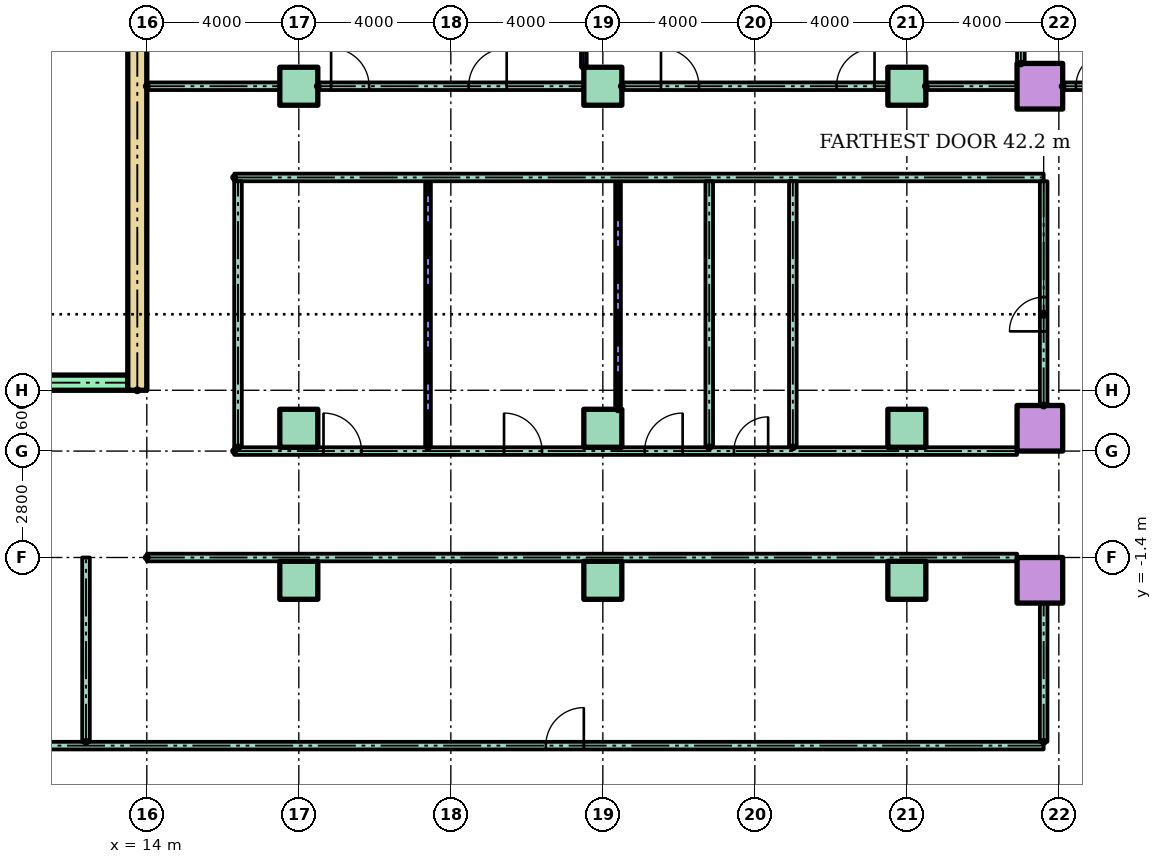
"""IFC4 building model, lengths in metres.
Left out: names, types, materials, properties, quantities, classifications, styles, units other than length and angle.
Written with IfcOpenShell. Run it as: python <this file> out.ifc"""

import sys

from ifc_helpers import new_model, si_unit, direction, frame, frame_2d, origin, origin_2d, place, context, subcontext, project, spatial, rectangle, hollow_rectangle, extrude, element, fill, save


model = new_model("IFC4")
c1 = context("Model", 3, precision=1e-05, world=origin(), true_north=direction((0.0, 1.0)))
c2 = subcontext(c1, "Body", "Model", "MODEL_VIEW")
j1 = project(units=[si_unit("LENGTHUNIT", "METRE"), si_unit("PLANEANGLEUNIT", "RADIAN")], contexts=[c1])
p1 = place(None, origin())
s1 = spatial("IfcSite", under=j1, at=p1, CompositionType="ELEMENT")
p2 = place(p1, origin())
s2 = spatial("IfcBuilding", under=s1, at=p2, CompositionType="ELEMENT")
p3 = place(p2, frame((0.0, 0.0, 6.0)))
s3 = spatial("IfcBuildingStorey", under=s2, at=p3, CompositionType="ELEMENT", Elevation=6.0)
for number, where in (
    (1, (18.0, -2.0, 0.0)),
    (2, (26.0, -2.0, 0.0)),
    (3, (34.0, -2.0, 0.0)),
):
    element("IfcColumn", number, at=place(p3, frame(where)), inside=s3, PredefinedType="COLUMN", context=c2, shape_type="SweptSolid", body=[
        extrude(rectangle(XDim=1.0, YDim=1.0, at=origin_2d()), origin(), (0.0, 0.0, 1.0), 4.0),
    ])
p4 = place(p3, frame((37.5, -2.0, 0.0)))
e4 = element("IfcColumn", 4, at=p4, inside=s3, PredefinedType="COLUMN", context=c2, shape_type="SweptSolid", body=[
    extrude(hollow_rectangle(XDim=1.2, YDim=1.2, WallThickness=0.06, at=origin_2d()), origin(), (0.0, 0.0, 1.0), 4.0),
])
for number, where in (
    (5, (18.0, 2.0, 0.0)),
    (6, (26.0, 2.0, 0.0)),
    (7, (34.0, 2.0, 0.0)),
):
    element("IfcColumn", number, at=place(p3, frame(where)), inside=s3, PredefinedType="COLUMN", context=c2, shape_type="SweptSolid", body=[
        extrude(rectangle(XDim=1.0, YDim=1.0, at=origin_2d()), origin(), (0.0, 0.0, 1.0), 4.0),
    ])
p5 = place(p3, frame((37.5, 2.0, 0.0)))
e8 = element("IfcColumn", 8, at=p5, inside=s3, PredefinedType="COLUMN", context=c2, shape_type="SweptSolid", body=[
    extrude(hollow_rectangle(XDim=1.2, YDim=1.2, WallThickness=0.06, at=origin_2d()), origin(), (0.0, 0.0, 1.0), 4.0),
])
for number, where in (
    (9, (18.0, 11.0, 0.0)),
    (10, (26.0, 11.0, 0.0)),
    (11, (34.0, 11.0, 0.0)),
):
    element("IfcColumn", number, at=place(p3, frame(where)), inside=s3, PredefinedType="COLUMN", context=c2, shape_type="SweptSolid", body=[
        extrude(rectangle(XDim=1.0, YDim=1.0, at=origin_2d()), origin(), (0.0, 0.0, 1.0), 4.0),
    ])
p6 = place(p3, frame((37.5, 11.0, 0.0)))
e12 = element("IfcColumn", 12, at=p6, inside=s3, PredefinedType="COLUMN", context=c2, shape_type="SweptSolid", body=[
    extrude(hollow_rectangle(XDim=1.2, YDim=1.2, WallThickness=0.06, at=origin_2d()), origin(), (0.0, 0.0, 1.0), 4.0),
])
p7 = place(p3, frame((13.75, 3.0, 0.0), z_axis=(0.0, 0.0, 1.0), x_axis=(0.0, 1.0, 0.0)))
e13 = element("IfcWall", 13, at=p7, inside=s3, PredefinedType="SHEAR", context=c2, shape_type="SweptSolid", body=[
    extrude(rectangle(XDim=17.0, YDim=0.5, at=frame_2d((8.5, 0.0))), origin(), (0.0, 0.0, 1.0), 3.7),
])
p8 = place(p3, frame((-13.5, 3.2, 0.0)))
e14 = element("IfcWall", 14, at=p8, inside=s3, PredefinedType="SHEAR", context=c2, shape_type="SweptSolid", body=[
    extrude(rectangle(XDim=27.0, YDim=0.4, at=frame_2d((13.5, 0.0))), origin(), (0.0, 0.0, 1.0), 3.7),
])
p9 = place(p8, frame((6.861, 0.0, 0.0)))
e15 = element("IfcOpeningElement", 15, at=p9, cuts=e14, PredefinedType="OPENING", context=c2, shape_type="SweptSolid", body=[
    extrude(rectangle(XDim=1.1, YDim=2.1, at=frame_2d((0.55, 1.05))), frame((0.0, 0.21, 0.0), z_axis=(0.0, -1.0, 0.0), x_axis=(1.0, 0.0, 0.0)), (0.0, 0.0, 1.0), 0.42),
])
p10 = place(p8, frame((9.906, 0.0, 0.0)))
e16 = element("IfcOpeningElement", 16, at=p10, cuts=e14, PredefinedType="OPENING", context=c2, shape_type="SweptSolid", body=[
    extrude(rectangle(XDim=1.1, YDim=2.1, at=frame_2d((0.55, 1.05))), frame((0.0, 0.21, 0.0), z_axis=(0.0, -1.0, 0.0), x_axis=(1.0, 0.0, 0.0)), (0.0, 0.0, 1.0), 0.42),
])
p11 = place(p8, frame((15.994, 0.0, 0.0)))
e17 = element("IfcOpeningElement", 17, at=p11, cuts=e14, PredefinedType="OPENING", context=c2, shape_type="SweptSolid", body=[
    extrude(rectangle(XDim=1.1, YDim=2.1, at=frame_2d((0.55, 1.05))), frame((0.0, 0.21, 0.0), z_axis=(0.0, -1.0, 0.0), x_axis=(1.0, 0.0, 0.0)), (0.0, 0.0, 1.0), 0.42),
])
p12 = place(p8, frame((19.039, 0.0, 0.0)))
e18 = element("IfcOpeningElement", 18, at=p12, cuts=e14, PredefinedType="OPENING", context=c2, shape_type="SweptSolid", body=[
    extrude(rectangle(XDim=1.1, YDim=2.1, at=frame_2d((0.55, 1.05))), frame((0.0, 0.21, 0.0), z_axis=(0.0, -1.0, 0.0), x_axis=(1.0, 0.0, 0.0)), (0.0, 0.0, 1.0), 0.42),
])
p13 = place(p8, frame((12.6, 0.0, 0.0)))
e19 = element("IfcOpeningElement", 19, at=p13, cuts=e14, PredefinedType="OPENING", context=c2, shape_type="SweptSolid", body=[
    extrude(rectangle(XDim=1.8, YDim=2.1, at=frame_2d((0.9, 1.05))), frame((0.0, 0.21, 0.0), z_axis=(0.0, -1.0, 0.0), x_axis=(1.0, 0.0, 0.0)), (0.0, 0.0, 1.0), 0.42),
])
p14 = place(p3, frame((-37.6, -6.35, 0.0)))
e20 = element("IfcWall", 20, at=p14, inside=s3, PredefinedType="PARTITIONING", context=c2, shape_type="SweptSolid", body=[
    extrude(rectangle(XDim=75.2, YDim=0.2, at=frame_2d((37.6, 0.0))), origin(), (0.0, 0.0, 1.0), 3.7),
])
p15 = place(p14, frame((4.0, 0.0, 0.0)))
e21 = element("IfcOpeningElement", 21, at=p15, cuts=e20, PredefinedType="OPENING", context=c2, shape_type="SweptSolid", body=[
    extrude(rectangle(XDim=1.0, YDim=2.1, at=frame_2d((0.5, 1.05))), frame((0.0, 0.11, 0.0), z_axis=(0.0, -1.0, 0.0), x_axis=(1.0, 0.0, 0.0)), (0.0, 0.0, 1.0), 0.22),
])
p16 = place(p14, frame((13.0, 0.0, 0.0)))
e22 = element("IfcOpeningElement", 22, at=p16, cuts=e20, PredefinedType="OPENING", context=c2, shape_type="SweptSolid", body=[
    extrude(rectangle(XDim=1.0, YDim=2.1, at=frame_2d((0.5, 1.05))), frame((0.0, 0.11, 0.0), z_axis=(0.0, -1.0, 0.0), x_axis=(1.0, 0.0, 0.0)), (0.0, 0.0, 1.0), 0.22),
])
p17 = place(p14, frame((21.55, 0.0, 0.0)))
e23 = element("IfcOpeningElement", 23, at=p17, cuts=e20, PredefinedType="OPENING", context=c2, shape_type="SweptSolid", body=[
    extrude(rectangle(XDim=0.9, YDim=2.1, at=frame_2d((0.45, 1.05))), frame((0.0, 0.11, 0.0), z_axis=(0.0, -1.0, 0.0), x_axis=(1.0, 0.0, 0.0)), (0.0, 0.0, 1.0), 0.22),
])
p18 = place(p14, frame((31.5, 0.0, 0.0)))
e24 = element("IfcOpeningElement", 24, at=p18, cuts=e20, PredefinedType="OPENING", context=c2, shape_type="SweptSolid", body=[
    extrude(rectangle(XDim=1.0, YDim=2.1, at=frame_2d((0.5, 1.05))), frame((0.0, 0.11, 0.0), z_axis=(0.0, -1.0, 0.0), x_axis=(1.0, 0.0, 0.0)), (0.0, 0.0, 1.0), 0.22),
])
p19 = place(p14, frame((43.5, 0.0, 0.0)))
e25 = element("IfcOpeningElement", 25, at=p19, cuts=e20, PredefinedType="OPENING", context=c2, shape_type="SweptSolid", body=[
    extrude(rectangle(XDim=1.0, YDim=2.1, at=frame_2d((0.5, 1.05))), frame((0.0, 0.11, 0.0), z_axis=(0.0, -1.0, 0.0), x_axis=(1.0, 0.0, 0.0)), (0.0, 0.0, 1.0), 0.22),
])
p20 = place(p14, frame((62.1, 0.0, 0.0)))
e26 = element("IfcOpeningElement", 26, at=p20, cuts=e20, PredefinedType="OPENING", context=c2, shape_type="SweptSolid", body=[
    extrude(rectangle(XDim=1.0, YDim=2.1, at=frame_2d((0.5, 1.05))), frame((0.0, 0.11, 0.0), z_axis=(0.0, -1.0, 0.0), x_axis=(1.0, 0.0, 0.0)), (0.0, 0.0, 1.0), 0.22),
])
p21 = place(p3, frame((14.0, -1.4, 0.0)))
e27 = element("IfcWall", 27, at=p21, inside=s3, PredefinedType="PARTITIONING", context=c2, shape_type="SweptSolid", body=[
    extrude(rectangle(XDim=22.9, YDim=0.2, at=frame_2d((11.45, 0.0))), origin(), (0.0, 0.0, 1.0), 3.7),
])
p22 = place(p3, frame((16.3, 1.4, 0.0)))
e28 = element("IfcWall", 28, at=p22, inside=s3, PredefinedType="PARTITIONING", context=c2, shape_type="SweptSolid", body=[
    extrude(rectangle(XDim=20.6, YDim=0.2, at=frame_2d((10.3, 0.0))), origin(), (0.0, 0.0, 1.0), 3.7),
])
p23 = place(p22, frame((2.35, 0.0, 0.0)))
e29 = element("IfcOpeningElement", 29, at=p23, cuts=e28, PredefinedType="OPENING", context=c2, shape_type="SweptSolid", body=[
    extrude(rectangle(XDim=1.0, YDim=2.1, at=frame_2d((0.5, 1.05))), frame((0.0, 0.11, 0.0), z_axis=(0.0, -1.0, 0.0), x_axis=(1.0, 0.0, 0.0)), (0.0, 0.0, 1.0), 0.22),
])
p24 = place(p22, frame((7.1, 0.0, 0.0)))
e30 = element("IfcOpeningElement", 30, at=p24, cuts=e28, PredefinedType="OPENING", context=c2, shape_type="SweptSolid", body=[
    extrude(rectangle(XDim=1.0, YDim=2.1, at=frame_2d((0.5, 1.05))), frame((0.0, 0.11, 0.0), z_axis=(0.0, -1.0, 0.0), x_axis=(1.0, 0.0, 0.0)), (0.0, 0.0, 1.0), 0.22),
])
p25 = place(p22, frame((10.8, 0.0, 0.0)))
e31 = element("IfcOpeningElement", 31, at=p25, cuts=e28, PredefinedType="OPENING", context=c2, shape_type="SweptSolid", body=[
    extrude(rectangle(XDim=1.0, YDim=2.1, at=frame_2d((0.5, 1.05))), frame((0.0, 0.11, 0.0), z_axis=(0.0, -1.0, 0.0), x_axis=(1.0, 0.0, 0.0)), (0.0, 0.0, 1.0), 0.22),
])
p26 = place(p22, frame((13.15, 0.0, 0.0)))
e32 = element("IfcOpeningElement", 32, at=p26, cuts=e28, PredefinedType="OPENING", context=c2, shape_type="SweptSolid", body=[
    extrude(rectangle(XDim=0.9, YDim=2.1, at=frame_2d((0.45, 1.05))), frame((0.0, 0.11, 0.0), z_axis=(0.0, -1.0, 0.0), x_axis=(1.0, 0.0, 0.0)), (0.0, 0.0, 1.0), 0.22),
])
p27 = place(p3, frame((16.3, 8.6, 0.0)))
e33 = element("IfcWall", 33, at=p27, inside=s3, PredefinedType="PARTITIONING", context=c2, shape_type="SweptSolid", body=[
    extrude(rectangle(XDim=21.3, YDim=0.2, at=frame_2d((10.65, 0.0))), origin(), (0.0, 0.0, 1.0), 3.7),
])
p28 = place(p3, frame((14.0, 11.0, 0.0)))
e34 = element("IfcWall", 34, at=p28, inside=s3, PredefinedType="PARTITIONING", context=c2, shape_type="SweptSolid", body=[
    extrude(rectangle(XDim=3.5, YDim=0.2, at=frame_2d((1.75, 0.0))), origin(), (0.0, 0.0, 1.0), 3.7),
])
p29 = place(p3, frame((18.5, 11.0, 0.0)))
e35 = element("IfcWall", 35, at=p29, inside=s3, PredefinedType="PARTITIONING", context=c2, shape_type="SweptSolid", body=[
    extrude(rectangle(XDim=7.0, YDim=0.2, at=frame_2d((3.5, 0.0))), origin(), (0.0, 0.0, 1.0), 3.7),
])
p30 = place(p29, frame((0.35, 0.0, 0.0)))
e36 = element("IfcOpeningElement", 36, at=p30, cuts=e35, PredefinedType="OPENING", context=c2, shape_type="SweptSolid", body=[
    extrude(rectangle(XDim=1.0, YDim=2.1, at=frame_2d((0.5, 1.05))), frame((0.0, 0.11, 0.0), z_axis=(0.0, -1.0, 0.0), x_axis=(1.0, 0.0, 0.0)), (0.0, 0.0, 1.0), 0.22),
])
p31 = place(p29, frame((3.97, 0.0, 0.0)))
e37 = element("IfcOpeningElement", 37, at=p31, cuts=e35, PredefinedType="OPENING", context=c2, shape_type="SweptSolid", body=[
    extrude(rectangle(XDim=1.0, YDim=2.1, at=frame_2d((0.5, 1.05))), frame((0.0, 0.11, 0.0), z_axis=(0.0, -1.0, 0.0), x_axis=(1.0, 0.0, 0.0)), (0.0, 0.0, 1.0), 0.22),
])
p32 = place(p3, frame((26.5, 11.0, 0.0)))
e38 = element("IfcWall", 38, at=p32, inside=s3, PredefinedType="PARTITIONING", context=c2, shape_type="SweptSolid", body=[
    extrude(rectangle(XDim=7.0, YDim=0.2, at=frame_2d((3.5, 0.0))), origin(), (0.0, 0.0, 1.0), 3.7),
])
p33 = place(p32, frame((1.03, 0.0, 0.0)))
e39 = element("IfcOpeningElement", 39, at=p33, cuts=e38, PredefinedType="OPENING", context=c2, shape_type="SweptSolid", body=[
    extrude(rectangle(XDim=1.0, YDim=2.1, at=frame_2d((0.5, 1.05))), frame((0.0, 0.11, 0.0), z_axis=(0.0, -1.0, 0.0), x_axis=(1.0, 0.0, 0.0)), (0.0, 0.0, 1.0), 0.22),
])
p34 = place(p32, frame((5.65, 0.0, 0.0)))
e40 = element("IfcOpeningElement", 40, at=p34, cuts=e38, PredefinedType="OPENING", context=c2, shape_type="SweptSolid", body=[
    extrude(rectangle(XDim=1.0, YDim=2.1, at=frame_2d((0.5, 1.05))), frame((0.0, 0.11, 0.0), z_axis=(0.0, -1.0, 0.0), x_axis=(1.0, 0.0, 0.0)), (0.0, 0.0, 1.0), 0.22),
])
p35 = place(p3, frame((34.5, 11.0, 0.0)))
e41 = element("IfcWall", 41, at=p35, inside=s3, PredefinedType="PARTITIONING", context=c2, shape_type="SweptSolid", body=[
    extrude(rectangle(XDim=2.4, YDim=0.2, at=frame_2d((1.2, 0.0))), origin(), (0.0, 0.0, 1.0), 3.7),
])
p36 = place(p3, frame((38.1, 11.0, 0.0)))
e42 = element("IfcWall", 42, at=p36, inside=s3, PredefinedType="PARTITIONING", context=c2, shape_type="SweptSolid", body=[
    extrude(rectangle(XDim=1.5, YDim=0.2, at=frame_2d((0.75, 0.0))), origin(), (0.0, 0.0, 1.0), 3.7),
])
p37 = place(p36, frame((0.35, 0.0, 0.0)))
e43 = element("IfcOpeningElement", 43, at=p37, cuts=e42, PredefinedType="OPENING", context=c2, shape_type="SweptSolid", body=[
    extrude(rectangle(XDim=0.9, YDim=2.1, at=frame_2d((0.45, 1.05))), frame((0.0, 0.11, 0.0), z_axis=(0.0, -1.0, 0.0), x_axis=(1.0, 0.0, 0.0)), (0.0, 0.0, 1.0), 0.22),
])
p38 = place(p3, frame((12.4, -6.25, 0.0), z_axis=(0.0, 0.0, 1.0), x_axis=(0.0, 1.0, 0.0)))
e44 = element("IfcWall", 44, at=p38, inside=s3, PredefinedType="PARTITIONING", context=c2, shape_type="SweptSolid", body=[
    extrude(rectangle(XDim=4.85, YDim=0.2, at=frame_2d((2.425, 0.0))), origin(), (0.0, 0.0, 1.0), 3.7),
])
p39 = place(p3, frame((16.4, 1.5, 0.0), z_axis=(0.0, 0.0, 1.0), x_axis=(0.0, 1.0, 0.0)))
e45 = element("IfcWall", 45, at=p39, inside=s3, PredefinedType="PARTITIONING", context=c2, shape_type="SweptSolid", body=[
    extrude(rectangle(XDim=7.0, YDim=0.2, at=frame_2d((3.5, 0.0))), origin(), (0.0, 0.0, 1.0), 3.7),
])
p40 = place(p3, frame((21.4, 1.5, 0.0), z_axis=(0.0, 0.0, 1.0), x_axis=(0.0, 1.0, 0.0)))
e46 = element("IfcWall", 46, at=p40, inside=s3, PredefinedType="PARTITIONING", context=c2, shape_type="SweptSolid", body=[
    extrude(rectangle(XDim=7.0, YDim=0.15, at=frame_2d((3.5, 0.0))), origin(), (0.0, 0.0, 1.0), 3.7),
])
p41 = place(p3, frame((25.5, 11.5, 0.0), z_axis=(0.0, 0.0, 1.0), x_axis=(0.0, 1.0, 0.0)))
e47 = element("IfcWall", 47, at=p41, inside=s3, PredefinedType="PARTITIONING", context=c2, shape_type="SweptSolid", body=[
    extrude(rectangle(XDim=7.4, YDim=0.15, at=frame_2d((3.7, 0.0))), origin(), (0.0, 0.0, 1.0), 3.7),
])
p42 = place(p3, frame((26.4, 2.5, 0.0), z_axis=(0.0, 0.0, 1.0), x_axis=(0.0, 1.0, 0.0)))
e48 = element("IfcWall", 48, at=p42, inside=s3, PredefinedType="PARTITIONING", context=c2, shape_type="SweptSolid", body=[
    extrude(rectangle(XDim=6.0, YDim=0.15, at=frame_2d((3.0, 0.0))), origin(), (0.0, 0.0, 1.0), 3.7),
])
for number, where, z_axis, x_axis in (
    (49, (28.8, 1.5, 0.0), (0.0, 0.0, 1.0), (0.0, 1.0, 0.0)),
    (50, (31.0, 1.5, 0.0), (0.0, 0.0, 1.0), (0.0, 1.0, 0.0)),
):
    element("IfcWall", number, at=place(p3, frame(where, z_axis=z_axis, x_axis=x_axis)), inside=s3, PredefinedType="PARTITIONING", context=c2, shape_type="SweptSolid", body=[
        extrude(rectangle(XDim=7.0, YDim=0.2, at=frame_2d((3.5, 0.0))), origin(), (0.0, 0.0, 1.0), 3.7),
    ])
p43 = place(p3, frame((37.0, 11.6, 0.0), z_axis=(0.0, 0.0, 1.0), x_axis=(0.0, 1.0, 0.0)))
e51 = element("IfcWall", 51, at=p43, inside=s3, PredefinedType="PARTITIONING", context=c2, shape_type="SweptSolid", body=[
    extrude(rectangle(XDim=2.8, YDim=0.2, at=frame_2d((1.4, 0.0))), origin(), (0.0, 0.0, 1.0), 3.7),
])
p44 = place(p3, frame((37.6, -6.25, 0.0), z_axis=(0.0, 0.0, 1.0), x_axis=(0.0, 1.0, 0.0)))
e52 = element("IfcWall", 52, at=p44, inside=s3, PredefinedType="PARTITIONING", context=c2, shape_type="SweptSolid", body=[
    extrude(rectangle(XDim=3.65, YDim=0.2, at=frame_2d((1.825, 0.0))), origin(), (0.0, 0.0, 1.0), 3.7),
])
p45 = place(p3, frame((37.6, 2.6, 0.0), z_axis=(0.0, 0.0, 1.0), x_axis=(0.0, 1.0, 0.0)))
e53 = element("IfcWall", 53, at=p45, inside=s3, PredefinedType="PARTITIONING", context=c2, shape_type="SweptSolid", body=[
    extrude(rectangle(XDim=5.9, YDim=0.2, at=frame_2d((2.95, 0.0))), origin(), (0.0, 0.0, 1.0), 3.7),
])
p46 = place(p45, frame((1.95, 0.0, 0.0)))
e54 = element("IfcOpeningElement", 54, at=p46, cuts=e53, PredefinedType="OPENING", context=c2, shape_type="SweptSolid", body=[
    extrude(rectangle(XDim=0.9, YDim=2.1, at=frame_2d((0.45, 1.05))), frame((0.0, 0.11, 0.0), z_axis=(0.0, -1.0, 0.0), x_axis=(1.0, 0.0, 0.0)), (0.0, 0.0, 1.0), 0.22),
])
p47 = place(p20, origin())
e55 = element("IfcDoor", 55, at=p47, inside=s3, OperationType="SINGLE_SWING_RIGHT", PredefinedType="DOOR", context=c2, shape_type="SweptSolid", body=[
    extrude(rectangle(XDim=1.0, YDim=2.1, at=frame_2d((0.5, 1.05))), frame((0.0, 0.025, 0.0), z_axis=(0.0, -1.0, 0.0), x_axis=(1.0, 0.0, 0.0)), (0.0, 0.0, 1.0), 0.05),
])
fill(e26, e55)
p48 = place(p23, origin())
e56 = element("IfcDoor", 56, at=p48, inside=s3, OperationType="SINGLE_SWING_LEFT", PredefinedType="DOOR", context=c2, shape_type="SweptSolid", body=[
    extrude(rectangle(XDim=1.0, YDim=2.1, at=frame_2d((0.5, 1.05))), frame((0.0, 0.025, 0.0), z_axis=(0.0, -1.0, 0.0), x_axis=(1.0, 0.0, 0.0)), (0.0, 0.0, 1.0), 0.05),
])
fill(e29, e56)
p49 = place(p24, origin())
e57 = element("IfcDoor", 57, at=p49, inside=s3, OperationType="SINGLE_SWING_LEFT", PredefinedType="DOOR", context=c2, shape_type="SweptSolid", body=[
    extrude(rectangle(XDim=1.0, YDim=2.1, at=frame_2d((0.5, 1.05))), frame((0.0, 0.025, 0.0), z_axis=(0.0, -1.0, 0.0), x_axis=(1.0, 0.0, 0.0)), (0.0, 0.0, 1.0), 0.05),
])
fill(e30, e57)
p50 = place(p25, origin())
e58 = element("IfcDoor", 58, at=p50, inside=s3, OperationType="SINGLE_SWING_RIGHT", PredefinedType="DOOR", context=c2, shape_type="SweptSolid", body=[
    extrude(rectangle(XDim=1.0, YDim=2.1, at=frame_2d((0.5, 1.05))), frame((0.0, 0.025, 0.0), z_axis=(0.0, -1.0, 0.0), x_axis=(1.0, 0.0, 0.0)), (0.0, 0.0, 1.0), 0.05),
])
fill(e31, e58)
p51 = place(p26, origin())
e59 = element("IfcDoor", 59, at=p51, inside=s3, OperationType="SINGLE_SWING_RIGHT", PredefinedType="DOOR", context=c2, shape_type="SweptSolid", body=[
    extrude(rectangle(XDim=0.9, YDim=2.1, at=frame_2d((0.45, 1.05))), frame((0.0, 0.025, 0.0), z_axis=(0.0, -1.0, 0.0), x_axis=(1.0, 0.0, 0.0)), (0.0, 0.0, 1.0), 0.05),
])
fill(e32, e59)
p52 = place(p46, origin())
e60 = element("IfcDoor", 60, at=p52, inside=s3, OperationType="SINGLE_SWING_LEFT", PredefinedType="DOOR", context=c2, shape_type="SweptSolid", body=[
    extrude(rectangle(XDim=0.9, YDim=2.1, at=frame_2d((0.45, 1.05))), frame((0.0, 0.025, 0.0), z_axis=(0.0, -1.0, 0.0), x_axis=(1.0, 0.0, 0.0)), (0.0, 0.0, 1.0), 0.05),
])
fill(e54, e60)
p53 = place(p30, origin())
e61 = element("IfcDoor", 61, at=p53, inside=s3, OperationType="SINGLE_SWING_LEFT", PredefinedType="DOOR", context=c2, shape_type="SweptSolid", body=[
    extrude(rectangle(XDim=1.0, YDim=2.1, at=frame_2d((0.5, 1.05))), frame((0.0, 0.025, 0.0), z_axis=(0.0, -1.0, 0.0), x_axis=(1.0, 0.0, 0.0)), (0.0, 0.0, 1.0), 0.05),
])
fill(e36, e61)
p54 = place(p31, origin())
e62 = element("IfcDoor", 62, at=p54, inside=s3, OperationType="SINGLE_SWING_RIGHT", PredefinedType="DOOR", context=c2, shape_type="SweptSolid", body=[
    extrude(rectangle(XDim=1.0, YDim=2.1, at=frame_2d((0.5, 1.05))), frame((0.0, 0.025, 0.0), z_axis=(0.0, -1.0, 0.0), x_axis=(1.0, 0.0, 0.0)), (0.0, 0.0, 1.0), 0.05),
])
fill(e37, e62)
p55 = place(p33, origin())
e63 = element("IfcDoor", 63, at=p55, inside=s3, OperationType="SINGLE_SWING_LEFT", PredefinedType="DOOR", context=c2, shape_type="SweptSolid", body=[
    extrude(rectangle(XDim=1.0, YDim=2.1, at=frame_2d((0.5, 1.05))), frame((0.0, 0.025, 0.0), z_axis=(0.0, -1.0, 0.0), x_axis=(1.0, 0.0, 0.0)), (0.0, 0.0, 1.0), 0.05),
])
fill(e39, e63)
p56 = place(p34, origin())
e64 = element("IfcDoor", 64, at=p56, inside=s3, OperationType="SINGLE_SWING_RIGHT", PredefinedType="DOOR", context=c2, shape_type="SweptSolid", body=[
    extrude(rectangle(XDim=1.0, YDim=2.1, at=frame_2d((0.5, 1.05))), frame((0.0, 0.025, 0.0), z_axis=(0.0, -1.0, 0.0), x_axis=(1.0, 0.0, 0.0)), (0.0, 0.0, 1.0), 0.05),
])
fill(e40, e64)
p57 = place(p37, origin())
e65 = element("IfcDoor", 65, at=p57, inside=s3, OperationType="SINGLE_SWING_RIGHT", PredefinedType="DOOR", context=c2, shape_type="SweptSolid", body=[
    extrude(rectangle(XDim=0.9, YDim=2.1, at=frame_2d((0.45, 1.05))), frame((0.0, 0.025, 0.0), z_axis=(0.0, -1.0, 0.0), x_axis=(1.0, 0.0, 0.0)), (0.0, 0.0, 1.0), 0.05),
])
fill(e43, e65)
save(model, sys.argv[1])
